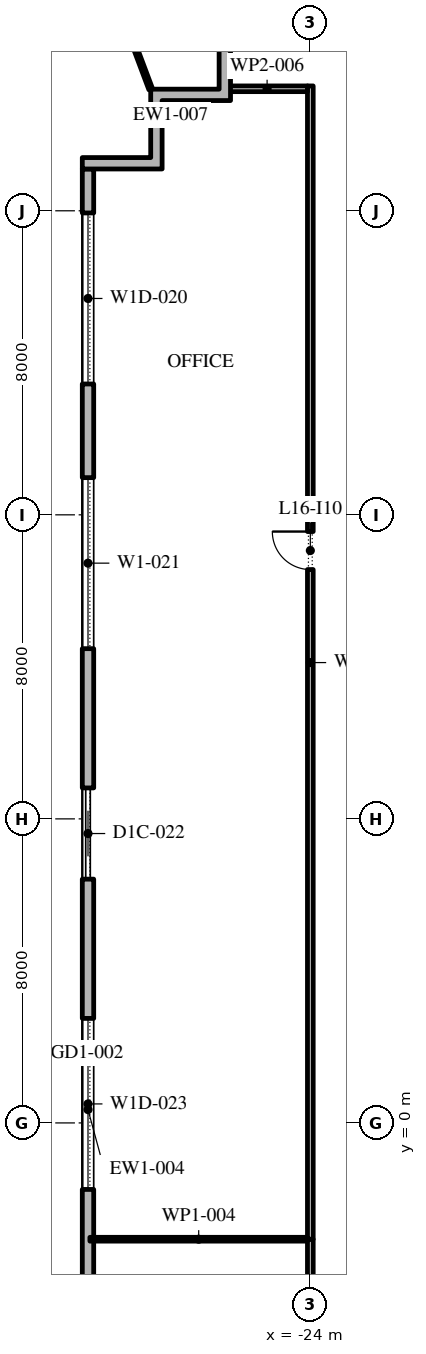
"""IFC4 building model, lengths in metres.
Left out: names, types, materials, properties, quantities, classifications, styles, units other than length and angle.
Written with IfcOpenShell. Run it as: python <this file> out.ifc"""

import sys

from ifc_helpers import new_model, si_unit, direction, frame, frame_2d, origin, place, context, subcontext, project, spatial, polyline, rectangle, outline, extrude, element, fill, save


model = new_model("IFC4")
c1 = context("Model", 3, precision=1e-05, world=origin(), true_north=direction((0.0, 1.0)))
c2 = subcontext(c1, "Body", "Model", "MODEL_VIEW")
j1 = project(units=[si_unit("LENGTHUNIT", "METRE"), si_unit("PLANEANGLEUNIT", "RADIAN")], contexts=[c1])
p1 = place(None, origin())
s1 = spatial("IfcSite", under=j1, at=p1, CompositionType="ELEMENT")
p2 = place(p1, origin())
s2 = spatial("IfcBuilding", under=s1, at=p2, CompositionType="ELEMENT")
p3 = place(p2, frame((0.0, 0.0, 77.4)))
s3 = spatial("IfcBuildingStorey", under=s2, at=p3, CompositionType="ELEMENT", Elevation=77.4)
p4 = place(p3, frame((-29.85, 25.1, 0.0), z_axis=(0.0, 0.0, 1.0), x_axis=(0.0, -1.0, 0.0)))
e1 = element("IfcWall", 1, at=p4, inside=s3, PredefinedType="STANDARD", context=c2, shape_type="SweptSolid", body=[
    extrude(rectangle(XDim=49.5, YDim=0.3, at=frame_2d((24.75, 0.0))), origin(), (0.0, 0.0, 1.0), 4.0),
])
p5 = place(p4, frame((1.157, 0.0, 0.45)))
e2 = element("IfcOpeningElement", 2, at=p5, cuts=e1, PredefinedType="OPENING", context=c2, shape_type="SweptSolid", body=[
    extrude(rectangle(XDim=4.5, YDim=2.875, at=frame_2d((2.25, 1.438))), frame((0.0, 0.16, 0.0), z_axis=(0.0, -1.0, 0.0), x_axis=(1.0, 0.0, 0.0)), (0.0, 0.0, 1.0), 0.32),
])
p6 = place(p4, frame((8.121, 0.0, 0.45)))
e3 = element("IfcOpeningElement", 3, at=p6, cuts=e1, PredefinedType="OPENING", context=c2, shape_type="SweptSolid", body=[
    extrude(rectangle(XDim=4.5, YDim=3.05, at=frame_2d((2.25, 1.525))), frame((0.0, 0.16, 0.0), z_axis=(0.0, -1.0, 0.0), x_axis=(1.0, 0.0, 0.0)), (0.0, 0.0, 1.0), 0.32),
])
p7 = place(p4, frame((16.286, 0.0, 0.0)))
e4 = element("IfcOpeningElement", 4, at=p7, cuts=e1, PredefinedType="OPENING", context=c2, shape_type="SweptSolid", body=[
    extrude(rectangle(XDim=2.4, YDim=3.325, at=frame_2d((1.2, 1.663))), frame((0.0, 0.16, 0.0), z_axis=(0.0, -1.0, 0.0), x_axis=(1.0, 0.0, 0.0)), (0.0, 0.0, 1.0), 0.32),
])
p8 = place(p4, frame((22.35, 0.0, 0.45)))
e5 = element("IfcOpeningElement", 5, at=p8, cuts=e1, PredefinedType="OPENING", context=c2, shape_type="SweptSolid", body=[
    extrude(rectangle(XDim=4.5, YDim=2.875, at=frame_2d((2.25, 1.438))), frame((0.0, 0.16, 0.0), z_axis=(0.0, -1.0, 0.0), x_axis=(1.0, 0.0, 0.0)), (0.0, 0.0, 1.0), 0.32),
])
p9 = place(p4, frame((29.464, 0.0, 0.45)))
e6 = element("IfcOpeningElement", 6, at=p9, cuts=e1, PredefinedType="OPENING", context=c2, shape_type="SweptSolid", body=[
    extrude(rectangle(XDim=4.5, YDim=2.875, at=frame_2d((2.25, 1.438))), frame((0.0, 0.16, 0.0), z_axis=(0.0, -1.0, 0.0), x_axis=(1.0, 0.0, 0.0)), (0.0, 0.0, 1.0), 0.32),
])
p10 = place(p4, frame((36.579, 0.0, 0.45)))
e7 = element("IfcOpeningElement", 7, at=p10, cuts=e1, PredefinedType="OPENING", context=c2, shape_type="SweptSolid", body=[
    extrude(rectangle(XDim=4.5, YDim=2.825, at=frame_2d((2.25, 1.413))), frame((0.0, 0.16, 0.0), z_axis=(0.0, -1.0, 0.0), x_axis=(1.0, 0.0, 0.0)), (0.0, 0.0, 1.0), 0.32),
])
p11 = place(p4, frame((44.743, 0.0, 0.0)))
e8 = element("IfcOpeningElement", 8, at=p11, cuts=e1, PredefinedType="OPENING", context=c2, shape_type="SweptSolid", body=[
    extrude(rectangle(XDim=2.4, YDim=3.5, at=frame_2d((1.2, 1.75))), frame((0.0, 0.16, 0.0), z_axis=(0.0, -1.0, 0.0), x_axis=(1.0, 0.0, 0.0)), (0.0, 0.0, 1.0), 0.32),
])
p12 = place(p3, origin())
e9 = element("IfcWall", 9, at=p12, inside=s3, PredefinedType="STANDARD", context=c2, shape_type="SweptSolid", body=[
    extrude(outline(polyline([(-28.2, 25.4), (-28.2, 27.2), (-26.4, 27.2), (-26.4, 28.7), (-26.1, 28.7), (-26.1, 26.9), (-27.9, 26.9), (-27.9, 25.1), (-30.0, 25.1), (-30.0, 25.4), (-28.2, 25.4)])), origin(), (0.0, 0.0, 1.0), 4.0),
])
p13 = place(p3, frame((-28.2, 27.2, -0.05), z_axis=(0.0, 0.0, 1.0), x_axis=(-0.351989298561, 0.936004024403, 0.0)))
e10 = element("IfcWall", 10, at=p13, inside=s3, PredefinedType="STANDARD", context=c2, shape_type="SweptSolid", body=[
    extrude(rectangle(XDim=5.808, YDim=0.1, at=frame_2d((2.904, 0.0))), origin(), (0.0, 0.0, 1.0), 4.05),
])
p14 = place(p3, frame((-24.0, -17.29, 0.0), z_axis=(0.0, 0.0, 1.0), x_axis=(0.0, 1.0, 0.0)))
e11 = element("IfcWall", 11, at=p14, inside=s3, PredefinedType="PARTITIONING", context=c2, shape_type="SweptSolid", body=[
    extrude(rectangle(XDim=14.23, YDim=0.15, at=frame_2d((7.115, 0.0))), origin(), (0.0, 0.0, 1.0), 4.0),
])
p15 = place(p14, frame((5.08, 0.0, 0.0)))
e12 = element("IfcOpeningElement", 12, at=p15, cuts=e11, PredefinedType="OPENING", context=c2, shape_type="SweptSolid", body=[
    extrude(rectangle(XDim=1.0, YDim=2.1, at=frame_2d((0.5, 1.05))), frame((0.0, 0.085, 0.0), z_axis=(0.0, -1.0, 0.0), x_axis=(1.0, 0.0, 0.0)), (0.0, 0.0, 1.0), 0.17),
])
p16 = place(p3, frame((-24.075, -3.06, 0.0), z_axis=(0.0, 0.0, 1.0), x_axis=(-1.0, 0.0, 0.0)))
e13 = element("IfcWall", 13, at=p16, inside=s3, PredefinedType="PARTITIONING", context=c2, shape_type="SweptSolid", body=[
    extrude(rectangle(XDim=5.725, YDim=0.1, at=frame_2d((2.863, 0.0))), origin(), (0.0, 0.0, 1.0), 4.0),
])
p17 = place(p3, frame((-24.0, -3.06, 0.0), z_axis=(0.0, 0.0, 1.0), x_axis=(0.0, 1.0, 0.0)))
e14 = element("IfcWall", 14, at=p17, inside=s3, PredefinedType="PARTITIONING", context=c2, shape_type="SweptSolid", body=[
    extrude(rectangle(XDim=30.345, YDim=0.15, at=frame_2d((15.172, 0.0))), origin(), (0.0, 0.0, 1.0), 4.0),
])
p18 = place(p17, frame((17.62, 0.0, 0.0)))
e15 = element("IfcOpeningElement", 15, at=p18, cuts=e14, PredefinedType="OPENING", context=c2, shape_type="SweptSolid", body=[
    extrude(rectangle(XDim=1.0, YDim=2.1, at=frame_2d((0.5, 1.05))), frame((0.0, 0.085, 0.0), z_axis=(0.0, -1.0, 0.0), x_axis=(1.0, 0.0, 0.0)), (0.0, 0.0, 1.0), 0.17),
])
p19 = place(p3, frame((-24.075, 27.21, 0.0), z_axis=(0.0, 0.0, 1.0), x_axis=(-1.0, 0.0, 0.0)))
e16 = element("IfcWall", 16, at=p19, inside=s3, PredefinedType="PARTITIONING", context=c2, shape_type="SweptSolid", body=[
    extrude(rectangle(XDim=2.125, YDim=0.15, at=frame_2d((1.062, 0.0))), origin(), (0.0, 0.0, 1.0), 4.0),
])
p20 = place(p5, origin())
e17 = element("IfcWindow", 17, at=p20, inside=s3, PartitioningType="DOUBLE_PANEL_VERTICAL", PredefinedType="WINDOW", context=c2, shape_type="SweptSolid", body=[
    extrude(rectangle(XDim=4.5, YDim=2.875, at=frame_2d((2.25, 1.438))), frame((0.0, 0.03, 0.0), z_axis=(0.0, -1.0, 0.0), x_axis=(1.0, 0.0, 0.0)), (0.0, 0.0, 1.0), 0.06),
])
fill(e2, e17)
p21 = place(p6, origin())
e18 = element("IfcWindow", 18, at=p21, inside=s3, PartitioningType="DOUBLE_PANEL_VERTICAL", PredefinedType="WINDOW", context=c2, shape_type="SweptSolid", body=[
    extrude(rectangle(XDim=4.5, YDim=3.05, at=frame_2d((2.25, 1.525))), frame((0.0, 0.03, 0.0), z_axis=(0.0, -1.0, 0.0), x_axis=(1.0, 0.0, 0.0)), (0.0, 0.0, 1.0), 0.06),
])
fill(e3, e18)
p22 = place(p7, origin())
e19 = element("IfcDoor", 19, at=p22, inside=s3, OperationType="DOUBLE_DOOR_SLIDING", PredefinedType="DOOR", context=c2, shape_type="SweptSolid", body=[
    extrude(rectangle(XDim=2.4, YDim=3.325, at=frame_2d((1.2, 1.663))), frame((0.0, 0.025, 0.0), z_axis=(0.0, -1.0, 0.0), x_axis=(1.0, 0.0, 0.0)), (0.0, 0.0, 1.0), 0.05),
])
fill(e4, e19)
p23 = place(p8, origin())
e20 = element("IfcWindow", 20, at=p23, inside=s3, PartitioningType="DOUBLE_PANEL_VERTICAL", PredefinedType="WINDOW", context=c2, shape_type="SweptSolid", body=[
    extrude(rectangle(XDim=4.5, YDim=2.875, at=frame_2d((2.25, 1.438))), frame((0.0, 0.03, 0.0), z_axis=(0.0, -1.0, 0.0), x_axis=(1.0, 0.0, 0.0)), (0.0, 0.0, 1.0), 0.06),
])
fill(e5, e20)
p24 = place(p18, origin())
e21 = element("IfcDoor", 21, at=p24, inside=s3, OperationType="SINGLE_SWING_LEFT", PredefinedType="DOOR", context=c2, shape_type="SweptSolid", body=[
    extrude(rectangle(XDim=1.0, YDim=2.1, at=frame_2d((0.5, 1.05))), frame((0.0, 0.025, 0.0), z_axis=(0.0, -1.0, 0.0), x_axis=(1.0, 0.0, 0.0)), (0.0, 0.0, 1.0), 0.05),
])
fill(e15, e21)
save(model, sys.argv[1])
